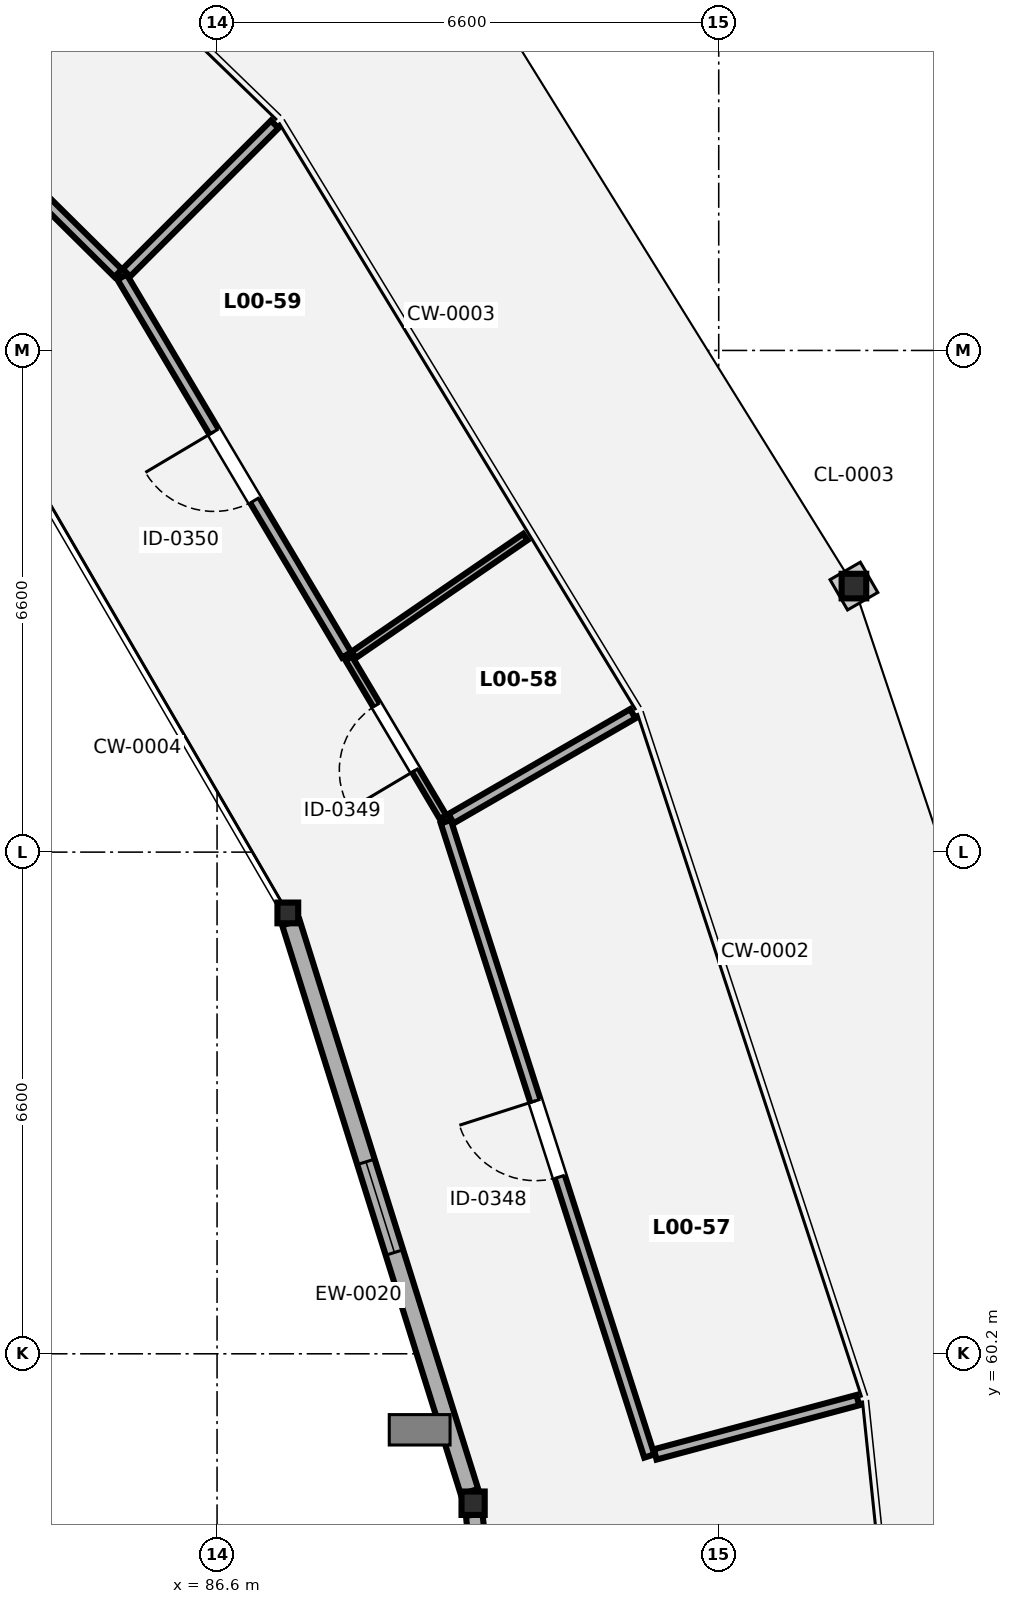
"""IFC4 building model, lengths in metres.
Left out: names, types, materials, properties, quantities, classifications, styles, units other than length and angle.
Written with IfcOpenShell. Run it as: python <this file> out.ifc"""

import sys

from ifc_helpers import new_model, si_unit, direction, frame, frame_2d, origin, origin_2d, place, context, subcontext, project, spatial, rectangle, hollow_circle, i_section, extrude, element, fill, save


model = new_model("IFC4")
c1 = context("Model", 3, precision=1e-05, world=origin(), true_north=direction((0.0, 1.0)))
c2 = subcontext(c1, "Body", "Model", "MODEL_VIEW")
j1 = project(units=[si_unit("LENGTHUNIT", "METRE"), si_unit("PLANEANGLEUNIT", "RADIAN")], contexts=[c1])
p1 = place(None, origin())
s1 = spatial("IfcSite", under=j1, at=p1, CompositionType="ELEMENT")
p2 = place(p1, origin())
s2 = spatial("IfcBuilding", under=s1, at=p2, CompositionType="ELEMENT")
p3 = place(p2, origin())
s3 = spatial("IfcBuildingStorey", under=s2, at=p3, CompositionType="ELEMENT", Elevation=0.0)
p4 = place(p3, frame((89.969, 58.234, 0.0), z_axis=(0.0, 0.0, 1.0), x_axis=(1.0, 0.0, 0.0)))
e1 = element("IfcColumn", 1, at=p4, inside=s3, PredefinedType="COLUMN", context=c2, shape_type="SweptSolid", body=[
    extrude(i_section(OverallWidth=0.305, OverallDepth=0.308, WebThickness=0.01, FlangeThickness=0.015, FilletRadius=0.017, at=origin_2d()), origin(), (0.0, 0.0, 1.0), 4.9),
])
p5 = place(p3, frame((94.979, 70.3, 0.0), z_axis=(0.0, 0.0, 1.0), x_axis=(1.0, 0.0, 0.0)))
e2 = element("IfcColumn", 2, at=p5, inside=s3, PredefinedType="COLUMN", context=c2, shape_type="SweptSolid", body=[
    extrude(hollow_circle(Radius=0.162, WallThickness=0.013, at=origin_2d()), origin(), (0.0, 0.0, 1.0), 4.9),
])
p6 = place(p3, frame((87.531, 66.0, 0.0), z_axis=(0.0, 0.0, 1.0), x_axis=(1.0, 0.0, 0.0)))
e3 = element("IfcColumn", 3, at=p6, inside=s3, PredefinedType="COLUMN", context=c2, shape_type="SweptSolid", body=[
    extrude(hollow_circle(Radius=0.136, WallThickness=0.009, at=origin_2d()), origin(), (0.0, 0.0, 1.0), 4.9),
])
p7 = place(p3, frame((90.784, 50.055, 0.0), z_axis=(0.0, 0.0, 1.0), x_axis=(-0.099243006395, 0.995063226977, 0.0)))
e4 = element("IfcWall", 4, at=p7, inside=s3, PredefinedType="SOLIDWALL", context=c2, shape_type="SweptSolid", body=[
    extrude(rectangle(XDim=8.066, YDim=0.22, at=frame_2d((4.033, 0.0))), origin(), (0.0, 0.0, 1.0), 4.35),
])
p8 = place(p7, frame((2.833, 0.0, 0.0)))
e5 = element("IfcOpeningElement", 5, at=p8, cuts=e4, PredefinedType="OPENING", context=c2, shape_type="SweptSolid", body=[
    extrude(rectangle(XDim=2.4, YDim=2.2, at=frame_2d((1.2, 1.1))), frame((0.0, 0.12, 0.0), z_axis=(0.0, -1.0, 0.0), x_axis=(1.0, 0.0, 0.0)), (0.0, 0.0, 1.0), 0.24),
])
p9 = place(p3, frame((89.921, 58.386, 0.0), z_axis=(0.0, 0.0, 1.0), x_axis=(-0.299477830639, 0.954103259064, 0.0)))
e6 = element("IfcWall", 6, at=p9, inside=s3, PredefinedType="SOLIDWALL", context=c2, shape_type="SweptSolid", body=[
    extrude(rectangle(XDim=7.846, YDim=0.24, at=frame_2d((3.923, 0.0))), origin(), (0.0, 0.0, 1.0), 4.35),
])
p10 = place(p9, frame((3.298, 0.0, 0.85)))
e7 = element("IfcOpeningElement", 7, at=p10, cuts=e6, PredefinedType="OPENING", context=c2, shape_type="SweptSolid", body=[
    extrude(rectangle(XDim=1.25, YDim=1.4, at=frame_2d((0.625, 0.7))), frame((0.0, 0.13, 0.0), z_axis=(0.0, -1.0, 0.0), x_axis=(1.0, 0.0, 0.0)), (0.0, 0.0, 1.0), 0.26),
])
p11 = place(p3, frame((92.287, 58.855, 0.0), z_axis=(0.0, 0.0, 1.0), x_axis=(-0.30548522006, 0.952196818061, 0.0)))
e8 = element("IfcWall", 8, at=p11, inside=s3, PredefinedType="PARTITIONING", context=c2, shape_type="SweptSolid", body=[
    extrude(rectangle(XDim=8.764, YDim=0.14, at=frame_2d((4.382, 0.0))), origin(), (0.0, 0.0, 1.0), 4.7),
])
p12 = place(p11, frame((3.857, 0.0, 0.0)))
e9 = element("IfcOpeningElement", 9, at=p12, cuts=e8, PredefinedType="OPENING", context=c2, shape_type="SweptSolid", body=[
    extrude(rectangle(XDim=1.05, YDim=2.15, at=frame_2d((0.525, 1.075))), frame((0.0, 0.08, 0.0), z_axis=(0.0, -1.0, 0.0), x_axis=(1.0, 0.0, 0.0)), (0.0, 0.0, 1.0), 0.16),
])
p13 = place(p3, frame((92.364, 58.876, 0.0), z_axis=(0.0, 0.0, 1.0), x_axis=(0.965925940868, 0.258818617489, 0.0)))
e10 = element("IfcWall", 10, at=p13, inside=s3, PredefinedType="PARTITIONING", context=c2, shape_type="SweptSolid", body=[
    extrude(rectangle(XDim=2.76, YDim=0.14, at=frame_2d((1.38, 0.0))), origin(), (0.0, 0.0, 1.0), 4.023),
])
p14 = place(p3, frame((89.679, 67.24, 0.0), z_axis=(0.0, 0.0, 1.0), x_axis=(0.866019141083, 0.50001084716, 0.0)))
e11 = element("IfcWall", 11, at=p14, inside=s3, PredefinedType="PARTITIONING", context=c2, shape_type="SweptSolid", body=[
    extrude(rectangle(XDim=2.76, YDim=0.14, at=frame_2d((1.38, 0.0))), origin(), (0.0, 0.0, 1.0), 4.092),
])
p15 = place(p3, frame((89.573, 67.262, 0.0), z_axis=(0.0, 0.0, 1.0), x_axis=(-0.510928867953, 0.859622994046, 0.0)))
e12 = element("IfcWall", 12, at=p15, inside=s3, PredefinedType="PARTITIONING", context=c2, shape_type="SweptSolid", body=[
    extrude(rectangle(XDim=2.429, YDim=0.1, at=frame_2d((1.214, 0.0))), origin(), (0.0, 0.0, 1.0), 4.7),
])
p16 = place(p15, frame((0.714, 0.0, 0.0)))
e13 = element("IfcOpeningElement", 13, at=p16, cuts=e12, PredefinedType="OPENING", context=c2, shape_type="SweptSolid", body=[
    extrude(rectangle(XDim=1.0, YDim=2.1, at=frame_2d((0.5, 1.05))), frame((0.0, 0.06, 0.0), z_axis=(0.0, -1.0, 0.0), x_axis=(1.0, 0.0, 0.0)), (0.0, 0.0, 1.0), 0.12),
])
p17 = place(p3, frame((88.398, 69.395, 0.0), z_axis=(0.0, 0.0, 1.0), x_axis=(0.824249911303, 0.566226177174, 0.0)))
e14 = element("IfcWall", 14, at=p17, inside=s3, PredefinedType="PARTITIONING", context=c2, shape_type="SweptSolid", body=[
    extrude(rectangle(XDim=2.739, YDim=0.1, at=frame_2d((1.37, 0.0))), origin(), (0.0, 0.0, 1.0), 4.7),
])
p18 = place(p3, frame((88.305, 69.395, 0.0), z_axis=(0.0, 0.0, 1.0), x_axis=(-0.510896676259, 0.859642126811, 0.0)))
e15 = element("IfcWall", 15, at=p18, inside=s3, PredefinedType="PARTITIONING", context=c2, shape_type="SweptSolid", body=[
    extrude(rectangle(XDim=5.783, YDim=0.14, at=frame_2d((2.892, 0.0))), origin(), (0.0, 0.0, 1.0), 4.7),
])
p19 = place(p18, frame((2.366, 0.0, 0.0)))
e16 = element("IfcOpeningElement", 16, at=p19, cuts=e15, PredefinedType="OPENING", context=c2, shape_type="SweptSolid", body=[
    extrude(rectangle(XDim=1.05, YDim=2.15, at=frame_2d((0.525, 1.075))), frame((0.0, 0.08, 0.0), z_axis=(0.0, -1.0, 0.0), x_axis=(1.0, 0.0, 0.0)), (0.0, 0.0, 1.0), 0.16),
])
p20 = place(p3, frame((85.407, 74.423, 0.0), z_axis=(0.0, 0.0, 1.0), x_axis=(0.707151009914, 0.707062549693, 0.0)))
e17 = element("IfcWall", 17, at=p20, inside=s3, PredefinedType="PARTITIONING", context=c2, shape_type="SweptSolid", body=[
    extrude(rectangle(XDim=2.76, YDim=0.14, at=frame_2d((1.38, 0.0))), origin(), (0.0, 0.0, 1.0), 4.092),
])
p21 = place(p3, frame((85.299, 74.417, 0.0), z_axis=(0.0, 0.0, 1.0), x_axis=(-0.710410596589, 0.703787456732, 0.0)))
e18 = element("IfcWall", 18, at=p21, inside=s3, PredefinedType="PARTITIONING", context=c2, shape_type="SweptSolid", body=[
    extrude(rectangle(XDim=7.741, YDim=0.14, at=frame_2d((3.871, 0.0))), origin(), (0.0, 0.0, 1.0), 4.7),
])
p22 = place(p21, frame((3.345, 0.0, 0.0)))
e19 = element("IfcOpeningElement", 19, at=p22, cuts=e18, PredefinedType="OPENING", context=c2, shape_type="SweptSolid", body=[
    extrude(rectangle(XDim=1.05, YDim=2.15, at=frame_2d((0.525, 1.075))), frame((0.0, 0.08, 0.0), z_axis=(0.0, -1.0, 0.0), x_axis=(1.0, 0.0, 0.0)), (0.0, 0.0, 1.0), 0.16),
])
p23 = place(p10, origin())
e20 = element("IfcWindow", 20, at=p23, inside=s3, PartitioningType="SINGLE_PANEL", PredefinedType="WINDOW", context=c2, shape_type="SweptSolid", body=[
    extrude(rectangle(XDim=1.25, YDim=1.4, at=frame_2d((0.625, 0.7))), frame((0.0, 0.03, 0.0), z_axis=(0.0, -1.0, 0.0), x_axis=(1.0, 0.0, 0.0)), (0.0, 0.0, 1.0), 0.06),
])
fill(e7, e20)
p24 = place(p12, origin())
e21 = element("IfcDoor", 21, at=p24, inside=s3, OperationType="SINGLE_SWING_RIGHT", PredefinedType="DOOR", context=c2, shape_type="SweptSolid", body=[
    extrude(rectangle(XDim=1.05, YDim=2.15, at=frame_2d((0.525, 1.075))), frame((0.0, 0.025, 0.0), z_axis=(0.0, -1.0, 0.0), x_axis=(1.0, 0.0, 0.0)), (0.0, 0.0, 1.0), 0.05),
])
fill(e9, e21)
p25 = place(p16, origin())
e22 = element("IfcDoor", 22, at=p25, inside=s3, OperationType="SINGLE_SWING_LEFT", PredefinedType="DOOR", context=c2, shape_type="SweptSolid", body=[
    extrude(rectangle(XDim=1.0, YDim=2.1, at=frame_2d((0.5, 1.05))), frame((0.0, 0.025, 0.0), z_axis=(0.0, -1.0, 0.0), x_axis=(1.0, 0.0, 0.0)), (0.0, 0.0, 1.0), 0.05),
])
fill(e13, e22)
p26 = place(p19, origin())
e23 = element("IfcDoor", 23, at=p26, inside=s3, OperationType="SINGLE_SWING_RIGHT", PredefinedType="DOOR", context=c2, shape_type="SweptSolid", body=[
    extrude(rectangle(XDim=1.05, YDim=2.15, at=frame_2d((0.525, 1.075))), frame((0.0, 0.025, 0.0), z_axis=(0.0, -1.0, 0.0), x_axis=(1.0, 0.0, 0.0)), (0.0, 0.0, 1.0), 0.05),
])
fill(e16, e23)
save(model, sys.argv[1])
